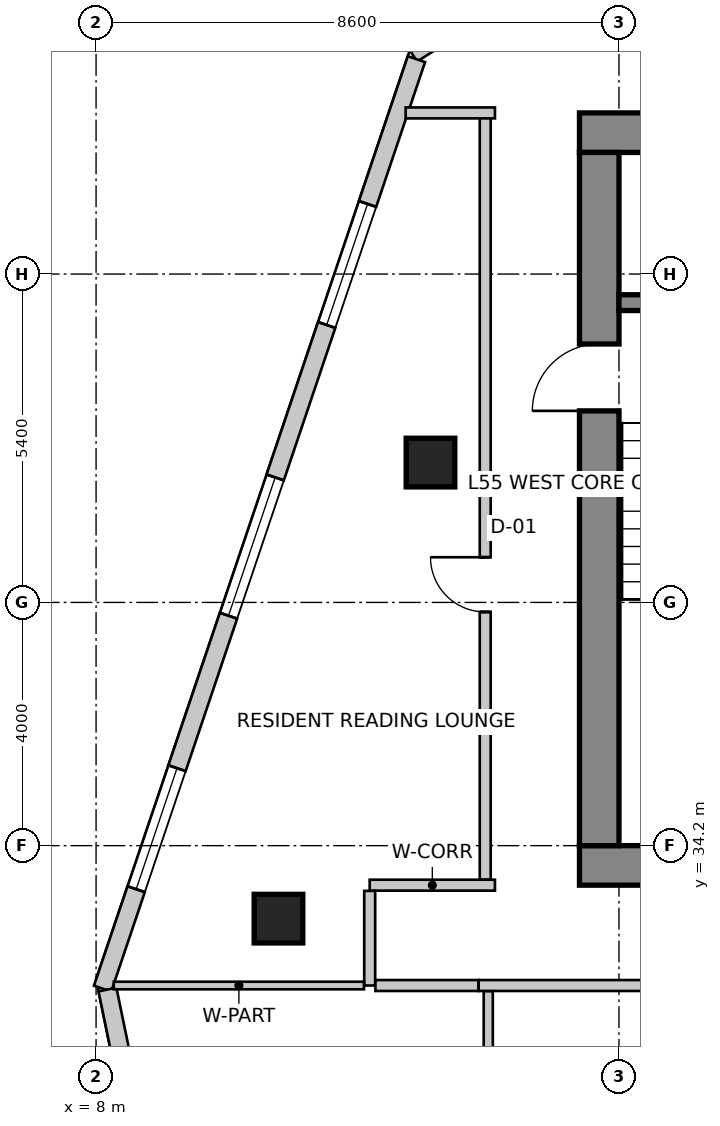
"""IFC4 building model, lengths in metres.
Left out: names, types, materials, properties, quantities, classifications, styles, units other than length and angle.
Written with IfcOpenShell. Run it as: python <this file> out.ifc"""

import sys

from ifc_helpers import new_model, si_unit, direction, frame, frame_2d, origin, origin_2d, place, context, subcontext, project, spatial, rectangle, extrude, source, transform, mapped, element, fill, save


model = new_model("IFC4")
c1 = context("Model", 3, precision=1e-05, world=origin(), true_north=direction((0.0, 1.0)))
c2 = subcontext(c1, "Body", "Model", "MODEL_VIEW")
j1 = project(units=[si_unit("LENGTHUNIT", "METRE"), si_unit("PLANEANGLEUNIT", "RADIAN")], contexts=[c1])
p1 = place(None, origin())
s1 = spatial("IfcSite", under=j1, at=p1, CompositionType="ELEMENT")
p2 = place(p1, origin())
s2 = spatial("IfcBuilding", under=s1, at=p2, CompositionType="ELEMENT")
p3 = place(p2, frame((0.0, 0.0, 218.4)))
s3 = spatial("IfcBuildingStorey", under=s2, at=p3, CompositionType="ELEMENT", Elevation=218.4)
p4 = place(p3, frame((15.95, 45.925, 0.0), z_axis=(0.0, 0.0, 1.0), x_axis=(1.0, 0.0, 0.0)))
e1 = element("IfcWall", 1, at=p4, inside=s3, PredefinedType="SHEAR", context=c2, shape_type="SweptSolid", body=[
    extrude(rectangle(XDim=15.7, YDim=0.65, at=frame_2d((7.85, 0.0))), origin(), (0.0, 0.0, 1.0), 3.5),
])
p5 = place(p3, frame((15.95, 33.875, 0.0), z_axis=(0.0, 0.0, 1.0), x_axis=(1.0, 0.0, 0.0)))
e2 = element("IfcWall", 2, at=p5, inside=s3, PredefinedType="SHEAR", context=c2, shape_type="SweptSolid", body=[
    extrude(rectangle(XDim=15.7, YDim=0.65, at=frame_2d((7.85, 0.0))), origin(), (0.0, 0.0, 1.0), 3.5),
])
m1 = source(origin(), c2, "Body", "SweptSolid", [
    extrude(rectangle(XDim=1.1, YDim=2.15, at=frame_2d((0.55, 1.075))), frame((0.0, 0.335, 0.0), z_axis=(0.0, -1.0, 0.0), x_axis=(1.0, 0.0, 0.0)), (0.0, 0.0, 1.0), 0.67),
])
p6 = place(p5, frame((10.08, 0.0, 0.0)))
e3 = element("IfcOpeningElement", 3, at=p6, cuts=e2, PredefinedType="OPENING", context=c2, shape_type="MappedRepresentation", body=[
    mapped(m1, transform((0.0, 0.0, 0.0), scale=1.0)),
])
p7 = place(p3, frame((16.275, 34.2, 0.0), z_axis=(0.0, 0.0, 1.0), x_axis=(0.0, 1.0, 0.0)))
e4 = element("IfcWall", 4, at=p7, inside=s3, PredefinedType="SHEAR", context=c2, shape_type="SweptSolid", body=[
    extrude(rectangle(XDim=11.4, YDim=0.65, at=frame_2d((5.7, 0.0))), origin(), (0.0, 0.0, 1.0), 3.5),
])
p8 = place(p7, frame((7.15, 0.0, 0.0)))
e5 = element("IfcOpeningElement", 5, at=p8, cuts=e4, PredefinedType="OPENING", context=c2, shape_type="MappedRepresentation", body=[
    mapped(m1, transform((0.0, 0.0, 0.0), scale=1.0)),
])
p9 = place(p3, frame((16.6, 43.13, 0.0), z_axis=(0.0, 0.0, 1.0), x_axis=(1.0, 0.0, 0.0)))
e6 = element("IfcWall", 6, at=p9, inside=s3, PredefinedType="SHEAR", context=c2, shape_type="SweptSolid", body=[
    extrude(rectangle(XDim=3.5, YDim=0.26, at=frame_2d((1.75, 0.0))), origin(), (0.0, 0.0, 1.0), 3.5),
])
m2 = source(origin(), c2, "Body", "SweptSolid", [
    extrude(rectangle(XDim=0.8, YDim=0.8, at=origin_2d()), origin(), (0.0, 0.0, 1.0), 3.5),
])
for number, where, z_axis, x_axis in (
    (7, (11.0, 33.0, 0.0), (0.0, 0.0, 1.0), (1.0, 0.0, 0.0)),
    (8, (13.5, 40.5, 0.0), (0.0, 0.0, 1.0), (1.0, 0.0, 0.0)),
):
    element("IfcColumn", number, at=place(p3, frame(where, z_axis=z_axis, x_axis=x_axis)), inside=s3, PredefinedType="COLUMN", context=c2, shape_type="MappedRepresentation", body=[
        mapped(m2, transform((0.0, 0.0, 0.0), scale=1.0)),
    ])
p10 = place(p3, frame((21.874, 52.742, 0.0), z_axis=(0.0, 0.0, 1.0), x_axis=(-0.84365659959, -0.536883173482, 0.0)))
e9 = element("IfcWall", 9, at=p10, inside=s3, PredefinedType="SOLIDWALL", context=c2, shape_type="SweptSolid", body=[
    extrude(rectangle(XDim=10.283, YDim=0.3, at=frame_2d((5.142, 0.0))), origin(), (0.0, 0.0, 1.0), 3.25),
])
m3 = source(origin(), c2, "Body", "SweptSolid", [
    extrude(rectangle(XDim=2.4, YDim=2.2, at=frame_2d((1.2, 1.1))), frame((0.0, 0.16, 0.0), z_axis=(0.0, -1.0, 0.0), x_axis=(1.0, 0.0, 0.0)), (0.0, 0.0, 1.0), 0.32),
])
p11 = place(p10, frame((3.307, 0.0, 0.85)))
e10 = element("IfcOpeningElement", 10, at=p11, cuts=e9, PredefinedType="OPENING", context=c2, shape_type="MappedRepresentation", body=[
    mapped(m3, transform((0.0, 0.0, 0.0), scale=1.0)),
])
p12 = place(p3, frame((13.269, 47.134, 0.0), z_axis=(0.0, 0.0, 1.0), x_axis=(-0.319920776449, -0.947444297464, 0.0)))
e11 = element("IfcWall", 11, at=p12, inside=s3, PredefinedType="SOLIDWALL", context=c2, shape_type="SweptSolid", body=[
    extrude(rectangle(XDim=16.133, YDim=0.3, at=frame_2d((8.067, 0.0))), origin(), (0.0, 0.0, 1.0), 3.25),
])
m4 = source(origin(), c2, "Body", "SweptSolid", [
    extrude(rectangle(XDim=2.1, YDim=2.0, at=frame_2d((1.05, 1.0))), frame((0.0, 0.16, 0.0), z_axis=(0.0, -1.0, 0.0), x_axis=(1.0, 0.0, 0.0)), (0.0, 0.0, 1.0), 0.32),
])
p13 = place(p12, frame((2.513, 0.0, 0.85)))
e12 = element("IfcOpeningElement", 12, at=p13, cuts=e11, PredefinedType="OPENING", context=c2, shape_type="MappedRepresentation", body=[
    mapped(m4, transform((0.0, 0.0, 0.0), scale=1.0)),
])
p14 = place(p12, frame((7.26, 0.0, 0.85)))
e13 = element("IfcOpeningElement", 13, at=p14, cuts=e11, PredefinedType="OPENING", context=c2, shape_type="MappedRepresentation", body=[
    mapped(m3, transform((0.0, 0.0, 0.0), scale=1.0)),
])
p15 = place(p12, frame((12.307, 0.0, 0.85)))
e14 = element("IfcOpeningElement", 14, at=p15, cuts=e11, PredefinedType="OPENING", context=c2, shape_type="MappedRepresentation", body=[
    mapped(m4, transform((0.0, 0.0, 0.0), scale=1.0)),
])
p16 = place(p3, frame((8.188, 31.834, 0.0), z_axis=(0.0, 0.0, 1.0), x_axis=(0.202303475707, -0.979322880217, 0.0)))
e15 = element("IfcWall", 15, at=p16, inside=s3, PredefinedType="SOLIDWALL", context=c2, shape_type="SweptSolid", body=[
    extrude(rectangle(XDim=15.766, YDim=0.3, at=frame_2d((7.883, 0.0))), origin(), (0.0, 0.0, 1.0), 3.25),
])
p17 = place(p16, frame((1.257, 0.0, 0.85)))
e16 = element("IfcOpeningElement", 16, at=p17, cuts=e15, PredefinedType="OPENING", context=c2, shape_type="MappedRepresentation", body=[
    mapped(m3, transform((0.0, 0.0, 0.0), scale=1.0)),
])
p18 = place(p16, frame((6.044, 0.0, 0.85)))
e17 = element("IfcOpeningElement", 17, at=p18, cuts=e15, PredefinedType="OPENING", context=c2, shape_type="MappedRepresentation", body=[
    mapped(m3, transform((0.0, 0.0, 0.0), scale=1.0)),
])
p19 = place(p16, frame((10.904, 0.0, 0.85)))
e18 = element("IfcOpeningElement", 18, at=p19, cuts=e15, PredefinedType="OPENING", context=c2, shape_type="MappedRepresentation", body=[
    mapped(m3, transform((0.0, 0.0, 0.0), scale=1.0)),
])
p20 = place(p3, frame((12.5, 33.55, 0.0), z_axis=(0.0, 0.0, 1.0), x_axis=(1.0, 0.0, 0.0)))
e19 = element("IfcWall", 19, at=p20, inside=s3, PredefinedType="PARTITIONING", context=c2, shape_type="SweptSolid", body=[
    extrude(rectangle(XDim=2.06, YDim=0.18, at=frame_2d((1.03, 0.0))), origin(), (0.0, 0.0, 1.0), 3.25),
])
p21 = place(p3, frame((12.5, 31.9, 0.0), z_axis=(0.0, 0.0, 1.0), x_axis=(0.0, 1.0, 0.0)))
e20 = element("IfcWall", 20, at=p21, inside=s3, PredefinedType="PARTITIONING", context=c2, shape_type="SweptSolid", body=[
    extrude(rectangle(XDim=1.556, YDim=0.18, at=frame_2d((0.778, 0.0))), origin(), (0.0, 0.0, 1.0), 2.919),
])
p22 = place(p3, frame((17.36, 31.9, 0.0), z_axis=(0.0, 0.0, 1.0), x_axis=(-1.0, 0.0, 0.0)))
e21 = element("IfcWall", 21, at=p22, inside=s3, PredefinedType="PARTITIONING", context=c2, shape_type="SweptSolid", body=[
    extrude(rectangle(XDim=3.07, YDim=0.18, at=frame_2d((1.535, 0.0))), origin(), (0.0, 0.0, 1.0), 2.919),
])
p23 = place(p3, frame((14.288, 31.9, 0.0), z_axis=(0.0, 0.0, 1.0), x_axis=(-1.0, 0.0, 0.0)))
e22 = element("IfcWall", 22, at=p23, inside=s3, PredefinedType="PARTITIONING", context=c2, shape_type="SweptSolid", body=[
    extrude(rectangle(XDim=1.694, YDim=0.18, at=frame_2d((0.847, 0.0))), origin(), (0.0, 0.0, 1.0), 2.919),
])
p24 = place(p3, frame((14.4, 33.644, 0.0), z_axis=(0.0, 0.0, 1.0), x_axis=(0.0, 1.0, 0.0)))
e23 = element("IfcWall", 23, at=p24, inside=s3, PredefinedType="PARTITIONING", context=c2, shape_type="SweptSolid", body=[
    extrude(rectangle(XDim=12.606, YDim=0.18, at=frame_2d((6.303, 0.0))), origin(), (0.0, 0.0, 1.0), 3.25),
])
m5 = source(origin(), c2, "Body", "SweptSolid", [
    extrude(rectangle(XDim=0.9, YDim=2.15, at=frame_2d((0.45, 1.075))), frame((0.0, 0.1, 0.0), z_axis=(0.0, -1.0, 0.0), x_axis=(1.0, 0.0, 0.0)), (0.0, 0.0, 1.0), 0.2),
])
p25 = place(p24, frame((4.399, 0.0, 0.0)))
e24 = element("IfcOpeningElement", 24, at=p25, cuts=e23, PredefinedType="OPENING", context=c2, shape_type="MappedRepresentation", body=[
    mapped(m5, transform((0.0, 0.0, 0.0), scale=1.0)),
])
p26 = place(p3, frame((14.56, 46.25, 0.0), z_axis=(0.0, 0.0, 1.0), x_axis=(-1.0, 0.0, 0.0)))
e25 = element("IfcWall", 25, at=p26, inside=s3, PredefinedType="PARTITIONING", context=c2, shape_type="SweptSolid", body=[
    extrude(rectangle(XDim=1.469, YDim=0.18, at=frame_2d((0.734, 0.0))), origin(), (0.0, 0.0, 1.0), 3.25),
])
p27 = place(p3, frame((12.406, 31.9, 0.0), z_axis=(0.0, 0.0, 1.0), x_axis=(-1.0, 0.0, 0.0)))
e26 = element("IfcWall", 26, at=p27, inside=s3, PredefinedType="PARTITIONING", context=c2, shape_type="SweptSolid", body=[
    extrude(rectangle(XDim=4.115, YDim=0.125, at=frame_2d((2.057, 0.0))), origin(), (0.0, 0.0, 1.0), 2.542),
])
p28 = place(p3, frame((14.45, 27.221, 0.0), z_axis=(0.0, 0.0, 1.0), x_axis=(0.0, 1.0, 0.0)))
e27 = element("IfcWall", 27, at=p28, inside=s3, PredefinedType="PARTITIONING", context=c2, shape_type="SweptSolid", body=[
    extrude(rectangle(XDim=4.585, YDim=0.15, at=frame_2d((2.292, 0.0))), origin(), (0.0, 0.0, 1.0), 2.766),
])
m6 = source(origin(), c2, "Body", "SweptSolid", [
    extrude(rectangle(XDim=2.1, YDim=2.0, at=frame_2d((1.05, 1.0))), frame((0.0, -0.015, 0.0), z_axis=(0.0, -1.0, 0.0), x_axis=(1.0, 0.0, 0.0)), (0.0, 0.0, 1.0), 0.06),
])
p29 = place(p13, origin())
e28 = element("IfcWindow", 28, at=p29, inside=s3, PartitioningType="SINGLE_PANEL", PredefinedType="WINDOW", context=c2, shape_type="MappedRepresentation", body=[
    mapped(m6, transform((0.0, 0.0, 0.0), scale=1.0)),
])
fill(e12, e28)
m7 = source(origin(), c2, "Body", "SweptSolid", [
    extrude(rectangle(XDim=2.4, YDim=2.2, at=frame_2d((1.2, 1.1))), frame((0.0, -0.015, 0.0), z_axis=(0.0, -1.0, 0.0), x_axis=(1.0, 0.0, 0.0)), (0.0, 0.0, 1.0), 0.06),
])
p30 = place(p14, origin())
e29 = element("IfcWindow", 29, at=p30, inside=s3, PartitioningType="SINGLE_PANEL", PredefinedType="WINDOW", context=c2, shape_type="MappedRepresentation", body=[
    mapped(m7, transform((0.0, 0.0, 0.0), scale=1.0)),
])
fill(e13, e29)
p31 = place(p15, origin())
e30 = element("IfcWindow", 30, at=p31, inside=s3, PartitioningType="SINGLE_PANEL", PredefinedType="WINDOW", context=c2, shape_type="MappedRepresentation", body=[
    mapped(m6, transform((0.0, 0.0, 0.0), scale=1.0)),
])
fill(e14, e30)
m8 = source(origin(), c2, "Body", "SweptSolid", [
    extrude(rectangle(XDim=1.1, YDim=2.15, at=frame_2d((0.55, 1.075))), frame((0.0, 0.025, 0.0), z_axis=(0.0, -1.0, 0.0), x_axis=(1.0, 0.0, 0.0)), (0.0, 0.0, 1.0), 0.05),
])
p32 = place(p8, origin())
e31 = element("IfcDoor", 31, at=p32, inside=s3, OperationType="SINGLE_SWING_LEFT", PredefinedType="DOOR", context=c2, shape_type="MappedRepresentation", body=[
    mapped(m8, transform((0.0, 0.0, 0.0), scale=1.0)),
])
fill(e5, e31)
m9 = source(origin(), c2, "Body", "SweptSolid", [
    extrude(rectangle(XDim=0.9, YDim=2.15, at=frame_2d((0.45, 1.075))), frame((0.0, 0.025, 0.0), z_axis=(0.0, -1.0, 0.0), x_axis=(1.0, 0.0, 0.0)), (0.0, 0.0, 1.0), 0.05),
])
p33 = place(p25, origin())
e32 = element("IfcDoor", 32, at=p33, inside=s3, OperationType="SINGLE_SWING_RIGHT", PredefinedType="DOOR", context=c2, shape_type="MappedRepresentation", body=[
    mapped(m9, transform((0.0, 0.0, 0.0), scale=1.0)),
])
fill(e24, e32)
save(model, sys.argv[1])
